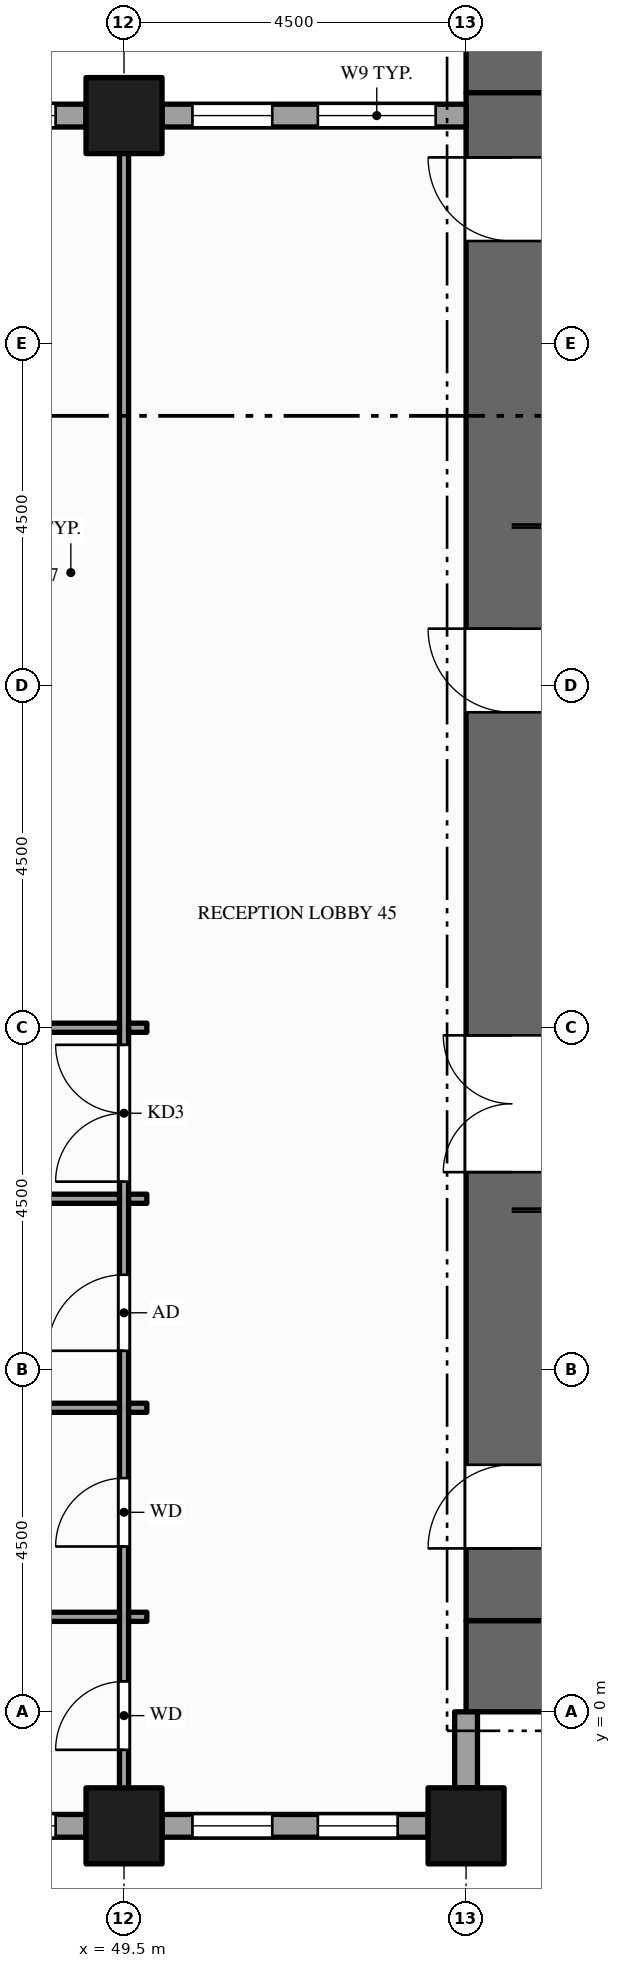
"""IFC4 building model, lengths in metres.
Left out: names, types, materials, properties, quantities, classifications, styles, units other than length and angle.
Written with IfcOpenShell. Run it as: python <this file> out.ifc"""

import sys

from ifc_helpers import new_model, si_unit, direction, frame, frame_2d, origin, origin_2d, place, context, subcontext, project, spatial, rectangle, hollow_rectangle, extrude, element, fill, save


model = new_model("IFC4")
c1 = context("Model", 3, precision=1e-05, world=origin(), true_north=direction((0.0, 1.0)))
c2 = subcontext(c1, "Body", "Model", "MODEL_VIEW")
j1 = project(units=[si_unit("LENGTHUNIT", "METRE"), si_unit("PLANEANGLEUNIT", "RADIAN")], contexts=[c1])
p1 = place(None, origin())
s1 = spatial("IfcSite", under=j1, at=p1, CompositionType="ELEMENT")
p2 = place(p1, origin())
s2 = spatial("IfcBuilding", under=s1, at=p2, CompositionType="ELEMENT")
p3 = place(p2, frame((0.0, 0.0, 107.0)))
s3 = spatial("IfcBuildingStorey", under=s2, at=p3, CompositionType="ELEMENT", Elevation=107.0)
for number, where, z_axis, x_axis in (
    (1, (67.5, 0.6, -0.15), (0.0, 0.0, 1.0), (-1.0, 0.0, 0.0)),
    (2, (54.0, 21.9, -0.15), (0.0, 0.0, 1.0), (1.0, 0.0, 0.0)),
):
    element("IfcWall", number, at=place(p3, frame(where, z_axis=z_axis, x_axis=x_axis)), inside=s3, PredefinedType="SHEAR", context=c2, shape_type="SweptSolid", body=[
        extrude(rectangle(XDim=13.5, YDim=1.2, at=frame_2d((6.75, 0.0))), origin(), (0.0, 0.0, 1.0), 4.0),
    ])
p4 = place(p3, frame((54.6, 1.2, -0.15), z_axis=(0.0, 0.0, 1.0), x_axis=(0.0, 1.0, 0.0)))
e3 = element("IfcWall", 3, at=p4, inside=s3, PredefinedType="SHEAR", context=c2, shape_type="SweptSolid", body=[
    extrude(rectangle(XDim=20.1, YDim=1.2, at=frame_2d((10.05, 0.0))), origin(), (0.0, 0.0, 1.0), 4.0),
])
p5 = place(p4, frame((5.9, 0.0, 0.15)))
e4 = element("IfcOpeningElement", 4, at=p5, cuts=e3, PredefinedType="OPENING", context=c2, shape_type="SweptSolid", body=[
    extrude(rectangle(XDim=1.8, YDim=2.1, at=frame_2d((0.9, 1.05))), frame((0.0, 0.61, 0.0), z_axis=(0.0, -1.0, 0.0), x_axis=(1.0, 0.0, 0.0)), (0.0, 0.0, 1.0), 1.22),
])
p6 = place(p4, frame((11.95, 0.0, 0.15)))
e5 = element("IfcOpeningElement", 5, at=p6, cuts=e3, PredefinedType="OPENING", context=c2, shape_type="SweptSolid", body=[
    extrude(rectangle(XDim=1.1, YDim=2.1, at=frame_2d((0.55, 1.05))), frame((0.0, 0.61, 0.0), z_axis=(0.0, -1.0, 0.0), x_axis=(1.0, 0.0, 0.0)), (0.0, 0.0, 1.0), 1.22),
])
p7 = place(p4, frame((0.95, 0.0, 0.15)))
e6 = element("IfcOpeningElement", 6, at=p7, cuts=e3, PredefinedType="OPENING", context=c2, shape_type="SweptSolid", body=[
    extrude(rectangle(XDim=1.1, YDim=2.1, at=frame_2d((0.55, 1.05))), frame((0.0, 0.61, 0.0), z_axis=(0.0, -1.0, 0.0), x_axis=(1.0, 0.0, 0.0)), (0.0, 0.0, 1.0), 1.22),
])
p8 = place(p4, frame((18.15, 0.0, 0.15)))
e7 = element("IfcOpeningElement", 7, at=p8, cuts=e3, PredefinedType="OPENING", context=c2, shape_type="SweptSolid", body=[
    extrude(rectangle(XDim=1.1, YDim=2.1, at=frame_2d((0.55, 1.05))), frame((0.0, 0.61, 0.0), z_axis=(0.0, -1.0, 0.0), x_axis=(1.0, 0.0, 0.0)), (0.0, 0.0, 1.0), 1.22),
])
for number, where, z_axis, x_axis in (
    (8, (49.5, -1.5, -0.15), (0.0, 0.0, 1.0), (1.0, 0.0, 0.0)),
    (9, (49.5, 21.0, -0.15), (0.0, 0.0, 1.0), (1.0, 0.0, 0.0)),
    (10, (54.0, -1.5, -0.15), (0.0, 0.0, 1.0), (1.0, 0.0, 0.0)),
):
    element("IfcColumn", number, at=place(p3, frame(where, z_axis=z_axis, x_axis=x_axis)), inside=s3, PredefinedType="COLUMN", context=c2, shape_type="SweptSolid", body=[
        extrude(hollow_rectangle(XDim=1.0, YDim=1.0, WallThickness=0.05, at=origin_2d()), origin(), (0.0, 0.0, 1.0), 4.0),
    ])
p9 = place(p3, frame((45.5, -1.5, 0.0), z_axis=(0.0, 0.0, 1.0), x_axis=(1.0, 0.0, 0.0)))
e11 = element("IfcWall", 11, at=p9, inside=s3, PredefinedType="STANDARD", context=c2, shape_type="SweptSolid", body=[
    extrude(rectangle(XDim=3.5, YDim=0.3, at=frame_2d((1.75, 0.0))), origin(), (0.0, 0.0, 1.0), 3.154),
])
p10 = place(p9, frame((0.4, 0.0, 0.9)))
e12 = element("IfcOpeningElement", 12, at=p10, cuts=e11, PredefinedType="OPENING", context=c2, shape_type="SweptSolid", body=[
    extrude(rectangle(XDim=1.05, YDim=2.0, at=frame_2d((0.525, 1.0))), frame((0.0, 0.16, 0.0), z_axis=(0.0, -1.0, 0.0), x_axis=(1.0, 0.0, 0.0)), (0.0, 0.0, 1.0), 0.32),
])
p11 = place(p9, frame((2.05, 0.0, 0.9)))
e13 = element("IfcOpeningElement", 13, at=p11, cuts=e11, PredefinedType="OPENING", context=c2, shape_type="SweptSolid", body=[
    extrude(rectangle(XDim=1.05, YDim=2.0, at=frame_2d((0.525, 1.0))), frame((0.0, 0.16, 0.0), z_axis=(0.0, -1.0, 0.0), x_axis=(1.0, 0.0, 0.0)), (0.0, 0.0, 1.0), 0.32),
])
p12 = place(p3, frame((50.0, -1.5, 0.0), z_axis=(0.0, 0.0, 1.0), x_axis=(1.0, 0.0, 0.0)))
e14 = element("IfcWall", 14, at=p12, inside=s3, PredefinedType="STANDARD", context=c2, shape_type="SweptSolid", body=[
    extrude(rectangle(XDim=3.5, YDim=0.3, at=frame_2d((1.75, 0.0))), origin(), (0.0, 0.0, 1.0), 3.154),
])
p13 = place(p12, frame((0.4, 0.0, 0.9)))
e15 = element("IfcOpeningElement", 15, at=p13, cuts=e14, PredefinedType="OPENING", context=c2, shape_type="SweptSolid", body=[
    extrude(rectangle(XDim=1.05, YDim=2.0, at=frame_2d((0.525, 1.0))), frame((0.0, 0.16, 0.0), z_axis=(0.0, -1.0, 0.0), x_axis=(1.0, 0.0, 0.0)), (0.0, 0.0, 1.0), 0.32),
])
p14 = place(p12, frame((2.05, 0.0, 0.9)))
e16 = element("IfcOpeningElement", 16, at=p14, cuts=e14, PredefinedType="OPENING", context=c2, shape_type="SweptSolid", body=[
    extrude(rectangle(XDim=1.05, YDim=2.0, at=frame_2d((0.525, 1.0))), frame((0.0, 0.16, 0.0), z_axis=(0.0, -1.0, 0.0), x_axis=(1.0, 0.0, 0.0)), (0.0, 0.0, 1.0), 0.32),
])
p15 = place(p3, frame((54.0, -1.0, 0.0), z_axis=(0.0, 0.0, 1.0), x_axis=(0.0, 1.0, 0.0)))
e17 = element("IfcWall", 17, at=p15, inside=s3, PredefinedType="STANDARD", context=c2, shape_type="SweptSolid", body=[
    extrude(rectangle(XDim=1.0, YDim=0.3, at=frame_2d((0.5, 0.0))), origin(), (0.0, 0.0, 1.0), 3.154),
])
p16 = place(p3, frame((54.0, 21.0, 0.0), z_axis=(0.0, 0.0, 1.0), x_axis=(-1.0, 0.0, 0.0)))
e18 = element("IfcWall", 18, at=p16, inside=s3, PredefinedType="STANDARD", context=c2, shape_type="SweptSolid", body=[
    extrude(rectangle(XDim=4.0, YDim=0.3, at=frame_2d((2.0, 0.0))), origin(), (0.0, 0.0, 1.0), 3.154),
])
p17 = place(p16, frame((0.4, 0.0, 0.9)))
e19 = element("IfcOpeningElement", 19, at=p17, cuts=e18, PredefinedType="OPENING", context=c2, shape_type="SweptSolid", body=[
    extrude(rectangle(XDim=1.55, YDim=2.0, at=frame_2d((0.775, 1.0))), frame((0.0, 0.16, 0.0), z_axis=(0.0, -1.0, 0.0), x_axis=(1.0, 0.0, 0.0)), (0.0, 0.0, 1.0), 0.32),
])
p18 = place(p16, frame((2.55, 0.0, 0.9)))
e20 = element("IfcOpeningElement", 20, at=p18, cuts=e18, PredefinedType="OPENING", context=c2, shape_type="SweptSolid", body=[
    extrude(rectangle(XDim=1.05, YDim=2.0, at=frame_2d((0.525, 1.0))), frame((0.0, 0.16, 0.0), z_axis=(0.0, -1.0, 0.0), x_axis=(1.0, 0.0, 0.0)), (0.0, 0.0, 1.0), 0.32),
])
p19 = place(p3, frame((49.0, 21.0, 0.0), z_axis=(0.0, 0.0, 1.0), x_axis=(-1.0, 0.0, 0.0)))
e21 = element("IfcWall", 21, at=p19, inside=s3, PredefinedType="STANDARD", context=c2, shape_type="SweptSolid", body=[
    extrude(rectangle(XDim=3.5, YDim=0.3, at=frame_2d((1.75, 0.0))), origin(), (0.0, 0.0, 1.0), 3.154),
])
p20 = place(p19, frame((0.4, 0.0, 0.9)))
e22 = element("IfcOpeningElement", 22, at=p20, cuts=e21, PredefinedType="OPENING", context=c2, shape_type="SweptSolid", body=[
    extrude(rectangle(XDim=1.05, YDim=2.0, at=frame_2d((0.525, 1.0))), frame((0.0, 0.16, 0.0), z_axis=(0.0, -1.0, 0.0), x_axis=(1.0, 0.0, 0.0)), (0.0, 0.0, 1.0), 0.32),
])
p21 = place(p19, frame((2.05, 0.0, 0.9)))
e23 = element("IfcOpeningElement", 23, at=p21, cuts=e21, PredefinedType="OPENING", context=c2, shape_type="SweptSolid", body=[
    extrude(rectangle(XDim=1.05, YDim=2.0, at=frame_2d((0.525, 1.0))), frame((0.0, 0.16, 0.0), z_axis=(0.0, -1.0, 0.0), x_axis=(1.0, 0.0, 0.0)), (0.0, 0.0, 1.0), 0.32),
])
p22 = place(p3, frame((49.5, -1.35, 0.0), z_axis=(0.0, 0.0, 1.0), x_axis=(0.0, 1.0, 0.0)))
e24 = element("IfcWall", 24, at=p22, inside=s3, PredefinedType="PARTITIONING", context=c2, shape_type="SweptSolid", body=[
    extrude(rectangle(XDim=22.2, YDim=0.12, at=frame_2d((11.1, 0.0))), origin(), (0.0, 0.0, 1.0), 2.938),
])
p23 = place(p22, frame((8.325, 0.0, 0.0)))
e25 = element("IfcOpeningElement", 25, at=p23, cuts=e24, PredefinedType="OPENING", context=c2, shape_type="SweptSolid", body=[
    extrude(rectangle(XDim=1.8, YDim=2.1, at=frame_2d((0.9, 1.05))), frame((0.0, 0.07, 0.0), z_axis=(0.0, -1.0, 0.0), x_axis=(1.0, 0.0, 0.0)), (0.0, 0.0, 1.0), 0.14),
])
p24 = place(p22, frame((0.85, 0.0, 0.0)))
e26 = element("IfcOpeningElement", 26, at=p24, cuts=e24, PredefinedType="OPENING", context=c2, shape_type="SweptSolid", body=[
    extrude(rectangle(XDim=0.9, YDim=2.1, at=frame_2d((0.45, 1.05))), frame((0.0, 0.07, 0.0), z_axis=(0.0, -1.0, 0.0), x_axis=(1.0, 0.0, 0.0)), (0.0, 0.0, 1.0), 0.14),
])
p25 = place(p22, frame((3.525, 0.0, 0.0)))
e27 = element("IfcOpeningElement", 27, at=p25, cuts=e24, PredefinedType="OPENING", context=c2, shape_type="SweptSolid", body=[
    extrude(rectangle(XDim=0.9, YDim=2.1, at=frame_2d((0.45, 1.05))), frame((0.0, 0.07, 0.0), z_axis=(0.0, -1.0, 0.0), x_axis=(1.0, 0.0, 0.0)), (0.0, 0.0, 1.0), 0.14),
])
p26 = place(p22, frame((6.1, 0.0, 0.0)))
e28 = element("IfcOpeningElement", 28, at=p26, cuts=e24, PredefinedType="OPENING", context=c2, shape_type="SweptSolid", body=[
    extrude(rectangle(XDim=1.0, YDim=2.1, at=frame_2d((0.5, 1.05))), frame((0.0, 0.07, 0.0), z_axis=(0.0, -1.0, 0.0), x_axis=(1.0, 0.0, 0.0)), (0.0, 0.0, 1.0), 0.14),
])
p27 = place(p3, frame((45.06, 1.25, 0.0), z_axis=(0.0, 0.0, 1.0), x_axis=(1.0, 0.0, 0.0)))
e29 = element("IfcWall", 29, at=p27, inside=s3, PredefinedType="PARTITIONING", context=c2, shape_type="SweptSolid", body=[
    extrude(rectangle(XDim=4.38, YDim=0.12, at=frame_2d((2.19, 0.0))), origin(), (0.0, 0.0, 1.0), 2.938),
])
p28 = place(p3, frame((49.56, 1.25, 0.0), z_axis=(0.0, 0.0, 1.0), x_axis=(1.0, 0.0, 0.0)))
e30 = element("IfcWall", 30, at=p28, inside=s3, PredefinedType="PARTITIONING", context=c2, shape_type="SweptSolid", body=[
    extrude(rectangle(XDim=0.24, YDim=0.12, at=frame_2d((0.12, 0.0))), origin(), (0.0, 0.0, 1.0), 2.938),
])
p29 = place(p3, frame((45.06, 4.0, 0.0), z_axis=(0.0, 0.0, 1.0), x_axis=(1.0, 0.0, 0.0)))
e31 = element("IfcWall", 31, at=p29, inside=s3, PredefinedType="PARTITIONING", context=c2, shape_type="SweptSolid", body=[
    extrude(rectangle(XDim=4.38, YDim=0.12, at=frame_2d((2.19, 0.0))), origin(), (0.0, 0.0, 1.0), 2.938),
])
p30 = place(p3, frame((49.56, 4.0, 0.0), z_axis=(0.0, 0.0, 1.0), x_axis=(1.0, 0.0, 0.0)))
e32 = element("IfcWall", 32, at=p30, inside=s3, PredefinedType="PARTITIONING", context=c2, shape_type="SweptSolid", body=[
    extrude(rectangle(XDim=0.24, YDim=0.12, at=frame_2d((0.12, 0.0))), origin(), (0.0, 0.0, 1.0), 2.938),
])
p31 = place(p3, frame((45.06, 6.75, 0.0), z_axis=(0.0, 0.0, 1.0), x_axis=(1.0, 0.0, 0.0)))
e33 = element("IfcWall", 33, at=p31, inside=s3, PredefinedType="PARTITIONING", context=c2, shape_type="SweptSolid", body=[
    extrude(rectangle(XDim=4.38, YDim=0.12, at=frame_2d((2.19, 0.0))), origin(), (0.0, 0.0, 1.0), 2.938),
])
p32 = place(p3, frame((49.56, 6.75, 0.0), z_axis=(0.0, 0.0, 1.0), x_axis=(1.0, 0.0, 0.0)))
e34 = element("IfcWall", 34, at=p32, inside=s3, PredefinedType="PARTITIONING", context=c2, shape_type="SweptSolid", body=[
    extrude(rectangle(XDim=0.24, YDim=0.12, at=frame_2d((0.12, 0.0))), origin(), (0.0, 0.0, 1.0), 2.938),
])
p33 = place(p3, frame((45.06, 9.0, 0.0), z_axis=(0.0, 0.0, 1.0), x_axis=(1.0, 0.0, 0.0)))
e35 = element("IfcWall", 35, at=p33, inside=s3, PredefinedType="PARTITIONING", context=c2, shape_type="SweptSolid", body=[
    extrude(rectangle(XDim=4.38, YDim=0.12, at=frame_2d((2.19, 0.0))), origin(), (0.0, 0.0, 1.0), 2.938),
])
p34 = place(p33, frame((1.59, 0.0, 0.0)))
e36 = element("IfcOpeningElement", 36, at=p34, cuts=e35, PredefinedType="OPENING", context=c2, shape_type="SweptSolid", body=[
    extrude(rectangle(XDim=1.2, YDim=2.1, at=frame_2d((0.6, 1.05))), frame((0.0, 0.07, 0.0), z_axis=(0.0, -1.0, 0.0), x_axis=(1.0, 0.0, 0.0)), (0.0, 0.0, 1.0), 0.14),
])
p35 = place(p3, frame((49.56, 9.0, 0.0), z_axis=(0.0, 0.0, 1.0), x_axis=(1.0, 0.0, 0.0)))
e37 = element("IfcWall", 37, at=p35, inside=s3, PredefinedType="PARTITIONING", context=c2, shape_type="SweptSolid", body=[
    extrude(rectangle(XDim=0.24, YDim=0.12, at=frame_2d((0.12, 0.0))), origin(), (0.0, 0.0, 1.0), 2.938),
])
p36 = place(p11, origin())
e38 = element("IfcWindow", 38, at=p36, inside=s3, PartitioningType="SINGLE_PANEL", PredefinedType="WINDOW", context=c2, shape_type="SweptSolid", body=[
    extrude(rectangle(XDim=1.05, YDim=2.0, at=frame_2d((0.525, 1.0))), frame((0.0, 0.03, 0.0), z_axis=(0.0, -1.0, 0.0), x_axis=(1.0, 0.0, 0.0)), (0.0, 0.0, 1.0), 0.06),
])
fill(e13, e38)
p37 = place(p13, origin())
e39 = element("IfcWindow", 39, at=p37, inside=s3, PartitioningType="SINGLE_PANEL", PredefinedType="WINDOW", context=c2, shape_type="SweptSolid", body=[
    extrude(rectangle(XDim=1.05, YDim=2.0, at=frame_2d((0.525, 1.0))), frame((0.0, 0.03, 0.0), z_axis=(0.0, -1.0, 0.0), x_axis=(1.0, 0.0, 0.0)), (0.0, 0.0, 1.0), 0.06),
])
fill(e15, e39)
p38 = place(p14, origin())
e40 = element("IfcWindow", 40, at=p38, inside=s3, PartitioningType="SINGLE_PANEL", PredefinedType="WINDOW", context=c2, shape_type="SweptSolid", body=[
    extrude(rectangle(XDim=1.05, YDim=2.0, at=frame_2d((0.525, 1.0))), frame((0.0, 0.03, 0.0), z_axis=(0.0, -1.0, 0.0), x_axis=(1.0, 0.0, 0.0)), (0.0, 0.0, 1.0), 0.06),
])
fill(e16, e40)
p39 = place(p17, origin())
e41 = element("IfcWindow", 41, at=p39, inside=s3, PartitioningType="SINGLE_PANEL", PredefinedType="WINDOW", context=c2, shape_type="SweptSolid", body=[
    extrude(rectangle(XDim=1.55, YDim=2.0, at=frame_2d((0.775, 1.0))), frame((0.0, 0.03, 0.0), z_axis=(0.0, -1.0, 0.0), x_axis=(1.0, 0.0, 0.0)), (0.0, 0.0, 1.0), 0.06),
])
fill(e19, e41)
p40 = place(p18, origin())
e42 = element("IfcWindow", 42, at=p40, inside=s3, PartitioningType="SINGLE_PANEL", PredefinedType="WINDOW", context=c2, shape_type="SweptSolid", body=[
    extrude(rectangle(XDim=1.05, YDim=2.0, at=frame_2d((0.525, 1.0))), frame((0.0, 0.03, 0.0), z_axis=(0.0, -1.0, 0.0), x_axis=(1.0, 0.0, 0.0)), (0.0, 0.0, 1.0), 0.06),
])
fill(e20, e42)
p41 = place(p20, origin())
e43 = element("IfcWindow", 43, at=p41, inside=s3, PartitioningType="SINGLE_PANEL", PredefinedType="WINDOW", context=c2, shape_type="SweptSolid", body=[
    extrude(rectangle(XDim=1.05, YDim=2.0, at=frame_2d((0.525, 1.0))), frame((0.0, 0.03, 0.0), z_axis=(0.0, -1.0, 0.0), x_axis=(1.0, 0.0, 0.0)), (0.0, 0.0, 1.0), 0.06),
])
fill(e22, e43)
p42 = place(p5, origin())
e44 = element("IfcDoor", 44, at=p42, inside=s3, OperationType="DOUBLE_DOOR_SINGLE_SWING", PredefinedType="DOOR", context=c2, shape_type="SweptSolid", body=[
    extrude(rectangle(XDim=1.8, YDim=2.1, at=frame_2d((0.9, 1.05))), frame((0.0, 0.025, 0.0), z_axis=(0.0, -1.0, 0.0), x_axis=(1.0, 0.0, 0.0)), (0.0, 0.0, 1.0), 0.05),
])
fill(e4, e44)
p43 = place(p6, origin())
e45 = element("IfcDoor", 45, at=p43, inside=s3, OperationType="SINGLE_SWING_RIGHT", PredefinedType="DOOR", context=c2, shape_type="SweptSolid", body=[
    extrude(rectangle(XDim=1.1, YDim=2.1, at=frame_2d((0.55, 1.05))), frame((0.0, 0.025, 0.0), z_axis=(0.0, -1.0, 0.0), x_axis=(1.0, 0.0, 0.0)), (0.0, 0.0, 1.0), 0.05),
])
fill(e5, e45)
p44 = place(p7, origin())
e46 = element("IfcDoor", 46, at=p44, inside=s3, OperationType="SINGLE_SWING_LEFT", PredefinedType="DOOR", context=c2, shape_type="SweptSolid", body=[
    extrude(rectangle(XDim=1.1, YDim=2.1, at=frame_2d((0.55, 1.05))), frame((0.0, 0.025, 0.0), z_axis=(0.0, -1.0, 0.0), x_axis=(1.0, 0.0, 0.0)), (0.0, 0.0, 1.0), 0.05),
])
fill(e6, e46)
p45 = place(p8, origin())
e47 = element("IfcDoor", 47, at=p45, inside=s3, OperationType="SINGLE_SWING_RIGHT", PredefinedType="DOOR", context=c2, shape_type="SweptSolid", body=[
    extrude(rectangle(XDim=1.1, YDim=2.1, at=frame_2d((0.55, 1.05))), frame((0.0, 0.025, 0.0), z_axis=(0.0, -1.0, 0.0), x_axis=(1.0, 0.0, 0.0)), (0.0, 0.0, 1.0), 0.05),
])
fill(e7, e47)
p46 = place(p23, origin())
e48 = element("IfcDoor", 48, at=p46, inside=s3, OperationType="DOUBLE_DOOR_SINGLE_SWING", PredefinedType="DOOR", context=c2, shape_type="SweptSolid", body=[
    extrude(rectangle(XDim=1.8, YDim=2.1, at=frame_2d((0.9, 1.05))), frame((0.0, 0.025, 0.0), z_axis=(0.0, -1.0, 0.0), x_axis=(1.0, 0.0, 0.0)), (0.0, 0.0, 1.0), 0.05),
])
fill(e25, e48)
p47 = place(p24, origin())
e49 = element("IfcDoor", 49, at=p47, inside=s3, OperationType="SINGLE_SWING_LEFT", PredefinedType="DOOR", context=c2, shape_type="SweptSolid", body=[
    extrude(rectangle(XDim=0.9, YDim=2.1, at=frame_2d((0.45, 1.05))), frame((0.0, 0.025, 0.0), z_axis=(0.0, -1.0, 0.0), x_axis=(1.0, 0.0, 0.0)), (0.0, 0.0, 1.0), 0.05),
])
fill(e26, e49)
p48 = place(p25, origin())
e50 = element("IfcDoor", 50, at=p48, inside=s3, OperationType="SINGLE_SWING_LEFT", PredefinedType="DOOR", context=c2, shape_type="SweptSolid", body=[
    extrude(rectangle(XDim=0.9, YDim=2.1, at=frame_2d((0.45, 1.05))), frame((0.0, 0.025, 0.0), z_axis=(0.0, -1.0, 0.0), x_axis=(1.0, 0.0, 0.0)), (0.0, 0.0, 1.0), 0.05),
])
fill(e27, e50)
p49 = place(p26, origin())
e51 = element("IfcDoor", 51, at=p49, inside=s3, OperationType="SINGLE_SWING_LEFT", PredefinedType="DOOR", context=c2, shape_type="SweptSolid", body=[
    extrude(rectangle(XDim=1.0, YDim=2.1, at=frame_2d((0.5, 1.05))), frame((0.0, 0.025, 0.0), z_axis=(0.0, -1.0, 0.0), x_axis=(1.0, 0.0, 0.0)), (0.0, 0.0, 1.0), 0.05),
])
fill(e28, e51)
save(model, sys.argv[1])
